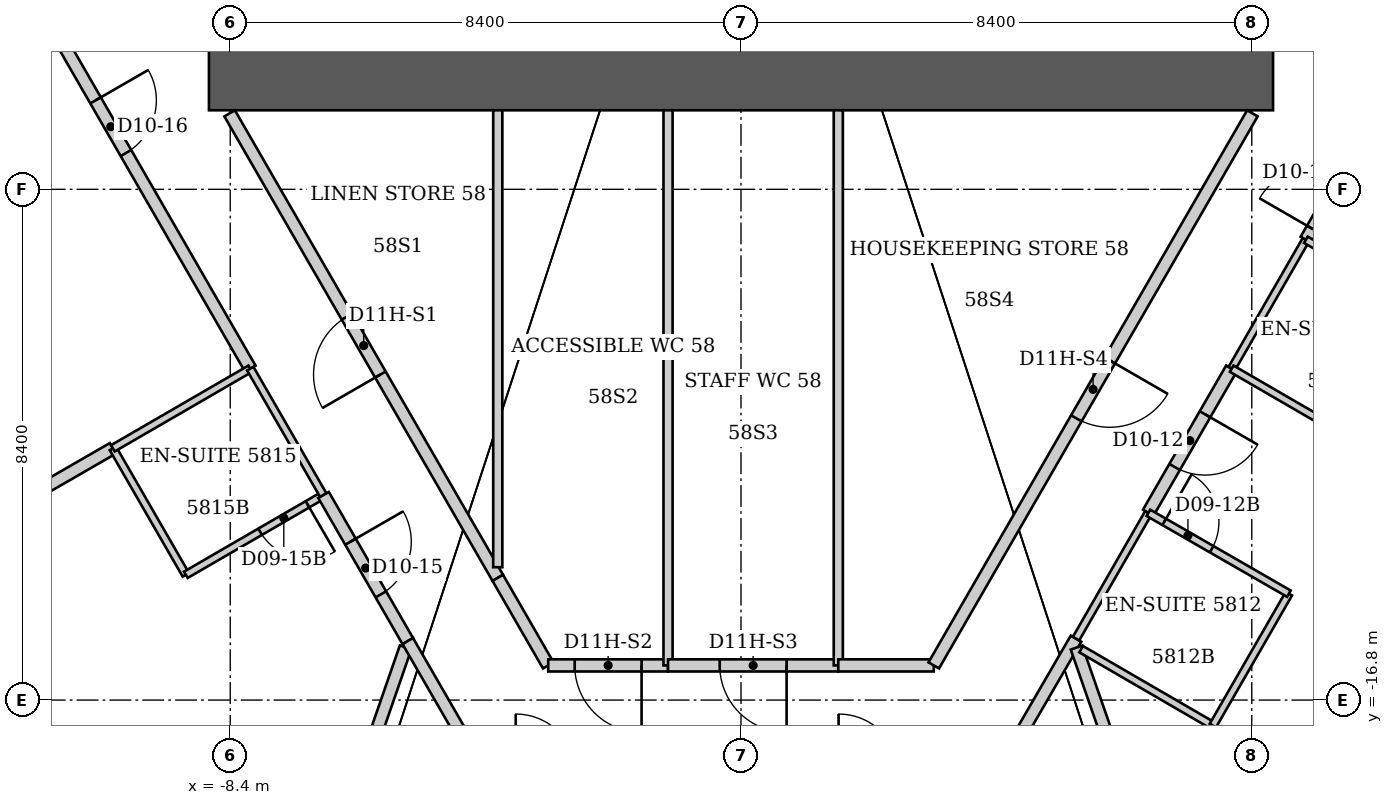
"""IFC4 building model, lengths in metres.
Left out: names, types, materials, properties, quantities, classifications, styles, units other than length and angle.
Written with IfcOpenShell. Run it as: python <this file> out.ifc"""

import sys

from ifc_helpers import new_model, si_unit, direction, frame, frame_2d, origin, place, context, subcontext, project, spatial, rectangle, extrude, element, fill, save


model = new_model("IFC4")
c1 = context("Model", 3, precision=1e-05, world=origin(), true_north=direction((0.0, 1.0)))
c2 = subcontext(c1, "Body", "Model", "MODEL_VIEW")
j1 = project(units=[si_unit("LENGTHUNIT", "METRE"), si_unit("PLANEANGLEUNIT", "RADIAN")], contexts=[c1])
p1 = place(None, origin())
s1 = spatial("IfcSite", under=j1, at=p1, CompositionType="ELEMENT")
p2 = place(p1, origin())
s2 = spatial("IfcBuilding", under=s1, at=p2, CompositionType="ELEMENT")
p3 = place(p2, frame((0.0, 0.0, 232.6)))
s3 = spatial("IfcBuildingStorey", under=s2, at=p3, CompositionType="ELEMENT", Elevation=232.6)
p4 = place(p3, frame((-8.75, -6.6, 0.0), z_axis=(0.0, 0.0, 1.0), x_axis=(1.0, 0.0, 0.0)))
e1 = element("IfcWall", 1, at=p4, inside=s3, PredefinedType="SHEAR", context=c2, shape_type="SweptSolid", body=[
    extrude(rectangle(XDim=17.5, YDim=1.0, at=frame_2d((8.75, 0.0))), origin(), (0.0, 0.0, 1.0), 3.8),
])
p5 = place(p3, frame((-15.326, -15.54, 0.0), z_axis=(0.0, 0.0, 1.0), x_axis=(0.866342721203, 0.499449986905, 0.0)))
e2 = element("IfcWall", 2, at=p5, inside=s3, PredefinedType="PARTITIONING", context=c2, shape_type="SweptSolid", body=[
    extrude(rectangle(XDim=5.767, YDim=0.2, at=frame_2d((2.883, 0.0))), origin(), (0.0, 0.0, 1.0), 3.64),
])
p6 = place(p3, frame((-12.66, -3.39, 0.0), z_axis=(0.0, 0.0, 1.0), x_axis=(0.499511590934, -0.866307203319, 0.0)))
e3 = element("IfcWall", 3, at=p6, inside=s3, PredefinedType="PARTITIONING", context=c2, shape_type="SweptSolid", body=[
    extrude(rectangle(XDim=9.189, YDim=0.2, at=frame_2d((4.594, 0.0))), origin(), (0.0, 0.0, 1.0), 3.64),
])
p7 = place(p6, frame((4.094, 0.0, 0.0)))
e4 = element("IfcOpeningElement", 4, at=p7, cuts=e3, PredefinedType="OPENING", context=c2, shape_type="SweptSolid", body=[
    extrude(rectangle(XDim=1.0, YDim=2.13, at=frame_2d((0.5, 1.065))), frame((0.0, 0.1, 0.0), z_axis=(0.0, -1.0, 0.0), x_axis=(1.0, 0.0, 0.0)), (0.0, 0.0, 1.0), 0.2),
])
p8 = place(p3, frame((-10.33, -12.66, 0.0), z_axis=(0.0, 0.0, 1.0), x_axis=(0.499693115345, -0.866202511239, 0.0)))
e5 = element("IfcWall", 5, at=p8, inside=s3, PredefinedType="PARTITIONING", context=c2, shape_type="SweptSolid", body=[
    extrude(rectangle(XDim=2.401, YDim=0.12, at=frame_2d((1.201, 0.0))), origin(), (0.0, 0.0, 1.0), 3.64),
])
p9 = place(p3, frame((-10.33, -12.66, 0.0), z_axis=(0.0, 0.0, 1.0), x_axis=(0.865195830568, 0.501434118073, 0.0)))
e6 = element("IfcWall", 6, at=p9, inside=s3, PredefinedType="PARTITIONING", context=c2, shape_type="SweptSolid", body=[
    extrude(rectangle(XDim=2.612, YDim=0.12, at=frame_2d((1.306, 0.0))), origin(), (0.0, 0.0, 1.0), 3.64),
])
p10 = place(p3, frame((-9.13, -14.74, 0.0), z_axis=(0.0, 0.0, 1.0), x_axis=(0.865131772832, 0.501544629755, 0.0)))
e7 = element("IfcWall", 7, at=p10, inside=s3, PredefinedType="PARTITIONING", context=c2, shape_type="SweptSolid", body=[
    extrude(rectangle(XDim=2.612, YDim=0.12, at=frame_2d((1.306, 0.0))), origin(), (0.0, 0.0, 1.0), 3.64),
])
p11 = place(p10, frame((1.412, 0.0, 0.0)))
e8 = element("IfcOpeningElement", 8, at=p11, cuts=e7, PredefinedType="OPENING", context=c2, shape_type="SweptSolid", body=[
    extrude(rectangle(XDim=0.9, YDim=2.03, at=frame_2d((0.45, 1.015))), frame((0.0, 0.06, 0.0), z_axis=(0.0, -1.0, 0.0), x_axis=(1.0, 0.0, 0.0)), (0.0, 0.0, 1.0), 0.12),
])
p12 = place(p3, frame((-9.01, -26.012, 0.0), z_axis=(0.0, 0.0, 1.0), x_axis=(0.327582991606, 0.944822408504, 0.0)))
e9 = element("IfcWall", 9, at=p12, inside=s3, PredefinedType="PARTITIONING", context=c2, shape_type="SweptSolid", body=[
    extrude(rectangle(XDim=10.667, YDim=0.2, at=frame_2d((5.333, 0.0))), origin(), (0.0, 0.0, 1.0), 3.64),
])
p13 = place(p3, frame((-8.07, -11.35, 0.0), z_axis=(0.0, 0.0, 1.0), x_axis=(0.499737123639, -0.866177122335, 0.0)))
e10 = element("IfcWall", 10, at=p13, inside=s3, PredefinedType="PARTITIONING", context=c2, shape_type="SweptSolid", body=[
    extrude(rectangle(XDim=2.401, YDim=0.12, at=frame_2d((1.201, 0.0))), origin(), (0.0, 0.0, 1.0), 3.64),
])
p14 = place(p3, frame((-6.865, -13.427, 0.0), z_axis=(0.0, 0.0, 1.0), x_axis=(0.499453176768, -0.866340882226, 0.0)))
e11 = element("IfcWall", 11, at=p14, inside=s3, PredefinedType="PARTITIONING", context=c2, shape_type="SweptSolid", body=[
    extrude(rectangle(XDim=2.773, YDim=0.2, at=frame_2d((1.387, 0.0))), origin(), (0.0, 0.0, 1.0), 3.64),
])
p15 = place(p14, frame((0.887, 0.0, 0.0)))
e12 = element("IfcOpeningElement", 12, at=p15, cuts=e11, PredefinedType="OPENING", context=c2, shape_type="SweptSolid", body=[
    extrude(rectangle(XDim=1.0, YDim=2.13, at=frame_2d((0.5, 1.065))), frame((0.0, 0.1, 0.0), z_axis=(0.0, -1.0, 0.0), x_axis=(1.0, 0.0, 0.0)), (0.0, 0.0, 1.0), 0.2),
])
p16 = place(p3, frame((-5.48, -15.83, 0.0), z_axis=(0.0, 0.0, 1.0), x_axis=(0.499963722229, -0.866046347752, 0.0)))
e13 = element("IfcWall", 13, at=p16, inside=s3, PredefinedType="PARTITIONING", context=c2, shape_type="SweptSolid", body=[
    extrude(rectangle(XDim=2.54, YDim=0.2, at=frame_2d((1.27, 0.0))), origin(), (0.0, 0.0, 1.0), 3.64),
])
p17 = place(p3, frame((-4.0, -14.79, 0.0), z_axis=(0.0, 0.0, 1.0), x_axis=(-0.499916512745, 0.866073599808, 0.0)))
e14 = element("IfcWall", 14, at=p17, inside=s3, PredefinedType="PARTITIONING", context=c2, shape_type="SweptSolid", body=[
    extrude(rectangle(XDim=8.821, YDim=0.2, at=frame_2d((4.411, 0.0))), origin(), (0.0, 0.0, 1.0), 3.64),
])
p18 = place(p17, frame((3.861, 0.0, 0.0)))
e15 = element("IfcOpeningElement", 15, at=p18, cuts=e14, PredefinedType="OPENING", context=c2, shape_type="SweptSolid", body=[
    extrude(rectangle(XDim=1.1, YDim=2.2, at=frame_2d((0.55, 1.1))), frame((0.0, 0.1, 0.0), z_axis=(0.0, -1.0, 0.0), x_axis=(1.0, 0.0, 0.0)), (0.0, 0.0, 1.0), 0.2),
])
p19 = place(p3, frame((-4.0, -7.1, 0.0), z_axis=(0.0, 0.0, 1.0), x_axis=(0.0, -1.0, 0.0)))
e16 = element("IfcWall", 16, at=p19, inside=s3, PredefinedType="PARTITIONING", context=c2, shape_type="SweptSolid", body=[
    extrude(rectangle(XDim=7.515, YDim=0.15, at=frame_2d((3.757, 0.0))), origin(), (0.0, 0.0, 1.0), 3.64),
])
p20 = place(p3, frame((-3.17, -16.23, 0.0), z_axis=(0.0, 0.0, 1.0), x_axis=(-0.499425709803, 0.866356716594, 0.0)))
e17 = element("IfcWall", 17, at=p20, inside=s3, PredefinedType="PARTITIONING", context=c2, shape_type="SweptSolid", body=[
    extrude(rectangle(XDim=1.662, YDim=0.2, at=frame_2d((0.831, 0.0))), origin(), (0.0, 0.0, 1.0), 3.64),
])
p21 = place(p3, frame((-1.2, -16.23, 0.0), z_axis=(0.0, 0.0, 1.0), x_axis=(-1.0, 0.0, 0.0)))
e18 = element("IfcWall", 18, at=p21, inside=s3, PredefinedType="PARTITIONING", context=c2, shape_type="SweptSolid", body=[
    extrude(rectangle(XDim=1.97, YDim=0.2, at=frame_2d((0.985, 0.0))), origin(), (0.0, 0.0, 1.0), 3.64),
])
p22 = place(p21, frame((0.435, 0.0, 0.0)))
e19 = element("IfcOpeningElement", 19, at=p22, cuts=e18, PredefinedType="OPENING", context=c2, shape_type="SweptSolid", body=[
    extrude(rectangle(XDim=1.1, YDim=2.2, at=frame_2d((0.55, 1.1))), frame((0.0, 0.1, 0.0), z_axis=(0.0, -1.0, 0.0), x_axis=(1.0, 0.0, 0.0)), (0.0, 0.0, 1.0), 0.2),
])
p23 = place(p3, frame((-1.2, -7.1, 0.0), z_axis=(0.0, 0.0, 1.0), x_axis=(0.0, -1.0, 0.0)))
e20 = element("IfcWall", 20, at=p23, inside=s3, PredefinedType="PARTITIONING", context=c2, shape_type="SweptSolid", body=[
    extrude(rectangle(XDim=9.13, YDim=0.15, at=frame_2d((4.565, 0.0))), origin(), (0.0, 0.0, 1.0), 3.64),
])
p24 = place(p3, frame((1.6, -16.23, 0.0), z_axis=(0.0, 0.0, 1.0), x_axis=(-1.0, 0.0, 0.0)))
e21 = element("IfcWall", 21, at=p24, inside=s3, PredefinedType="PARTITIONING", context=c2, shape_type="SweptSolid", body=[
    extrude(rectangle(XDim=2.8, YDim=0.2, at=frame_2d((1.4, 0.0))), origin(), (0.0, 0.0, 1.0), 3.64),
])
p25 = place(p24, frame((0.85, 0.0, 0.0)))
e22 = element("IfcOpeningElement", 22, at=p25, cuts=e21, PredefinedType="OPENING", context=c2, shape_type="SweptSolid", body=[
    extrude(rectangle(XDim=1.1, YDim=2.2, at=frame_2d((0.55, 1.1))), frame((0.0, 0.1, 0.0), z_axis=(0.0, -1.0, 0.0), x_axis=(1.0, 0.0, 0.0)), (0.0, 0.0, 1.0), 0.2),
])
p26 = place(p3, frame((1.6, -7.1, 0.0), z_axis=(0.0, 0.0, 1.0), x_axis=(0.0, -1.0, 0.0)))
e23 = element("IfcWall", 23, at=p26, inside=s3, PredefinedType="PARTITIONING", context=c2, shape_type="SweptSolid", body=[
    extrude(rectangle(XDim=9.13, YDim=0.15, at=frame_2d((4.565, 0.0))), origin(), (0.0, 0.0, 1.0), 3.64),
])
p27 = place(p3, frame((3.17, -16.23, 0.0), z_axis=(0.0, 0.0, 1.0), x_axis=(-1.0, 0.0, 0.0)))
e24 = element("IfcWall", 24, at=p27, inside=s3, PredefinedType="PARTITIONING", context=c2, shape_type="SweptSolid", body=[
    extrude(rectangle(XDim=1.57, YDim=0.2, at=frame_2d((0.785, 0.0))), origin(), (0.0, 0.0, 1.0), 3.64),
])
p28 = place(p3, frame((5.51, -15.79, 0.0), z_axis=(0.0, 0.0, 1.0), x_axis=(-0.501964949025, -0.864887963814, 0.0)))
e25 = element("IfcWall", 25, at=p28, inside=s3, PredefinedType="PARTITIONING", context=c2, shape_type="SweptSolid", body=[
    extrude(rectangle(XDim=2.59, YDim=0.2, at=frame_2d((1.295, 0.0))), origin(), (0.0, 0.0, 1.0), 3.64),
])
p29 = place(p3, frame((5.51, -15.79, 0.0), z_axis=(0.0, 0.0, 1.0), x_axis=(0.49836161924, 0.866969259241, 0.0)))
e26 = element("IfcWall", 26, at=p29, inside=s3, PredefinedType="PARTITIONING", context=c2, shape_type="SweptSolid", body=[
    extrude(rectangle(XDim=2.388, YDim=0.12, at=frame_2d((1.194, 0.0))), origin(), (0.0, 0.0, 1.0), 3.64),
])
p30 = place(p3, frame((5.517, -15.937, 0.0), z_axis=(0.0, 0.0, 1.0), x_axis=(0.328714924291, -0.944429191919, 0.0)))
e27 = element("IfcWall", 27, at=p30, inside=s3, PredefinedType="PARTITIONING", context=c2, shape_type="SweptSolid", body=[
    extrude(rectangle(XDim=2.534, YDim=0.2, at=frame_2d((1.267, 0.0))), origin(), (0.0, 0.0, 1.0), 3.64),
])
p31 = place(p3, frame((5.594, -15.963, 0.0), z_axis=(0.0, 0.0, 1.0), x_axis=(0.864900876675, -0.501942699445, 0.0)))
e28 = element("IfcWall", 28, at=p31, inside=s3, PredefinedType="PARTITIONING", context=c2, shape_type="SweptSolid", body=[
    extrude(rectangle(XDim=2.505, YDim=0.12, at=frame_2d((1.252, 0.0))), origin(), (0.0, 0.0, 1.0), 3.038),
])
p32 = place(p3, frame((7.76, -17.22, 0.0), z_axis=(0.0, 0.0, 1.0), x_axis=(0.499159685399, 0.866510016372, 0.0)))
e29 = element("IfcWall", 29, at=p32, inside=s3, PredefinedType="PARTITIONING", context=c2, shape_type="SweptSolid", body=[
    extrude(rectangle(XDim=2.504, YDim=0.12, at=frame_2d((1.252, 0.0))), origin(), (0.0, 0.0, 1.0), 3.64),
])
p33 = place(p3, frame((8.065, -11.347, 0.0), z_axis=(0.0, 0.0, 1.0), x_axis=(-0.499611785355, -0.866249423627, 0.0)))
e30 = element("IfcWall", 30, at=p33, inside=s3, PredefinedType="PARTITIONING", context=c2, shape_type="SweptSolid", body=[
    extrude(rectangle(XDim=2.738, YDim=0.2, at=frame_2d((1.369, 0.0))), origin(), (0.0, 0.0, 1.0), 3.64),
])
p34 = place(p33, frame((0.869, 0.0, 0.0)))
e31 = element("IfcOpeningElement", 31, at=p34, cuts=e30, PredefinedType="OPENING", context=c2, shape_type="SweptSolid", body=[
    extrude(rectangle(XDim=1.0, YDim=2.13, at=frame_2d((0.5, 1.065))), frame((0.0, 0.1, 0.0), z_axis=(0.0, -1.0, 0.0), x_axis=(1.0, 0.0, 0.0)), (0.0, 0.0, 1.0), 0.2),
])
p35 = place(p3, frame((8.07, -11.35, 0.0), z_axis=(0.0, 0.0, 1.0), x_axis=(0.498748634132, 0.866746675766, 0.0)))
e32 = element("IfcWall", 32, at=p35, inside=s3, PredefinedType="PARTITIONING", context=c2, shape_type="SweptSolid", body=[
    extrude(rectangle(XDim=2.446, YDim=0.12, at=frame_2d((1.223, 0.0))), origin(), (0.0, 0.0, 1.0), 3.64),
])
p36 = place(p3, frame((8.07, -11.35, 0.0), z_axis=(0.0, 0.0, 1.0), x_axis=(0.865006586495, -0.501760505939, 0.0)))
e33 = element("IfcWall", 33, at=p36, inside=s3, PredefinedType="PARTITIONING", context=c2, shape_type="SweptSolid", body=[
    extrude(rectangle(XDim=2.67, YDim=0.12, at=frame_2d((1.335, 0.0))), origin(), (0.0, 0.0, 1.0), 3.64),
])
p37 = place(p3, frame((8.41, -7.15, 0.0), z_axis=(0.0, 0.0, 1.0), x_axis=(-0.499828628176, -0.866124322748, 0.0)))
e34 = element("IfcWall", 34, at=p37, inside=s3, PredefinedType="PARTITIONING", context=c2, shape_type="SweptSolid", body=[
    extrude(rectangle(XDim=10.484, YDim=0.2, at=frame_2d((5.242, 0.0))), origin(), (0.0, 0.0, 1.0), 3.64),
])
p38 = place(p37, frame((4.692, 0.0, 0.0)))
e35 = element("IfcOpeningElement", 35, at=p38, cuts=e34, PredefinedType="OPENING", context=c2, shape_type="SweptSolid", body=[
    extrude(rectangle(XDim=1.1, YDim=2.2, at=frame_2d((0.55, 1.1))), frame((0.0, 0.1, 0.0), z_axis=(0.0, -1.0, 0.0), x_axis=(1.0, 0.0, 0.0)), (0.0, 0.0, 1.0), 0.2),
])
p39 = place(p3, frame((9.01, -15.05, 0.0), z_axis=(0.0, 0.0, 1.0), x_axis=(-0.866615255992, 0.498976951453, 0.0)))
e36 = element("IfcWall", 36, at=p39, inside=s3, PredefinedType="PARTITIONING", context=c2, shape_type="SweptSolid", body=[
    extrude(rectangle(XDim=2.666, YDim=0.12, at=frame_2d((1.333, 0.0))), origin(), (0.0, 0.0, 1.0), 3.64),
])
p40 = place(p39, frame((1.466, 0.0, 0.0)))
e37 = element("IfcOpeningElement", 37, at=p40, cuts=e36, PredefinedType="OPENING", context=c2, shape_type="SweptSolid", body=[
    extrude(rectangle(XDim=0.9, YDim=2.03, at=frame_2d((0.45, 1.015))), frame((0.0, 0.06, 0.0), z_axis=(0.0, -1.0, 0.0), x_axis=(1.0, 0.0, 0.0)), (0.0, 0.0, 1.0), 0.12),
])
p41 = place(p3, frame((9.29, -9.23, 0.0), z_axis=(0.0, 0.0, 1.0), x_axis=(0.499910949922, 0.866076810767, 0.0)))
e38 = element("IfcWall", 38, at=p41, inside=s3, PredefinedType="PARTITIONING", context=c2, shape_type="SweptSolid", body=[
    extrude(rectangle(XDim=1.42, YDim=0.2, at=frame_2d((0.71, 0.0))), origin(), (0.0, 0.0, 1.0), 3.64),
])
p42 = place(p41, frame((0.21, 0.0, 0.0)))
e39 = element("IfcOpeningElement", 39, at=p42, cuts=e38, PredefinedType="OPENING", context=c2, shape_type="SweptSolid", body=[
    extrude(rectangle(XDim=1.0, YDim=2.13, at=frame_2d((0.5, 1.065))), frame((0.0, 0.1, 0.0), z_axis=(0.0, -1.0, 0.0), x_axis=(1.0, 0.0, 0.0)), (0.0, 0.0, 1.0), 0.2),
])
p43 = place(p3, frame((11.6, -10.56, 0.0), z_axis=(0.0, 0.0, 1.0), x_axis=(-0.866615255992, 0.498976951453, 0.0)))
e40 = element("IfcWall", 40, at=p43, inside=s3, PredefinedType="PARTITIONING", context=c2, shape_type="SweptSolid", body=[
    extrude(rectangle(XDim=2.666, YDim=0.12, at=frame_2d((1.333, 0.0))), origin(), (0.0, 0.0, 1.0), 3.64),
])
p44 = place(p43, frame((1.466, 0.0, 0.0)))
e41 = element("IfcOpeningElement", 41, at=p44, cuts=e40, PredefinedType="OPENING", context=c2, shape_type="SweptSolid", body=[
    extrude(rectangle(XDim=0.9, YDim=2.03, at=frame_2d((0.45, 1.015))), frame((0.0, 0.06, 0.0), z_axis=(0.0, -1.0, 0.0), x_axis=(1.0, 0.0, 0.0)), (0.0, 0.0, 1.0), 0.12),
])
p45 = place(p42, origin())
e42 = element("IfcDoor", 42, at=p45, inside=s3, OperationType="SINGLE_SWING_LEFT", PredefinedType="DOOR", context=c2, shape_type="SweptSolid", body=[
    extrude(rectangle(XDim=1.0, YDim=2.13, at=frame_2d((0.5, 1.065))), frame((0.0, 0.025, 0.0), z_axis=(0.0, -1.0, 0.0), x_axis=(1.0, 0.0, 0.0)), (0.0, 0.0, 1.0), 0.05),
])
fill(e39, e42)
p46 = place(p34, origin())
e43 = element("IfcDoor", 43, at=p46, inside=s3, OperationType="SINGLE_SWING_LEFT", PredefinedType="DOOR", context=c2, shape_type="SweptSolid", body=[
    extrude(rectangle(XDim=1.0, YDim=2.13, at=frame_2d((0.5, 1.065))), frame((0.0, 0.025, 0.0), z_axis=(0.0, -1.0, 0.0), x_axis=(1.0, 0.0, 0.0)), (0.0, 0.0, 1.0), 0.05),
])
fill(e31, e43)
p47 = place(p40, origin())
e44 = element("IfcDoor", 44, at=p47, inside=s3, OperationType="SINGLE_SWING_RIGHT", PredefinedType="DOOR", context=c2, shape_type="SweptSolid", body=[
    extrude(rectangle(XDim=0.9, YDim=2.03, at=frame_2d((0.45, 1.015))), frame((0.0, 0.025, 0.0), z_axis=(0.0, -1.0, 0.0), x_axis=(1.0, 0.0, 0.0)), (0.0, 0.0, 1.0), 0.05),
])
fill(e37, e44)
p48 = place(p15, origin())
e45 = element("IfcDoor", 45, at=p48, inside=s3, OperationType="SINGLE_SWING_LEFT", PredefinedType="DOOR", context=c2, shape_type="SweptSolid", body=[
    extrude(rectangle(XDim=1.0, YDim=2.13, at=frame_2d((0.5, 1.065))), frame((0.0, 0.025, 0.0), z_axis=(0.0, -1.0, 0.0), x_axis=(1.0, 0.0, 0.0)), (0.0, 0.0, 1.0), 0.05),
])
fill(e12, e45)
p49 = place(p11, origin())
e46 = element("IfcDoor", 46, at=p49, inside=s3, OperationType="SINGLE_SWING_RIGHT", PredefinedType="DOOR", context=c2, shape_type="SweptSolid", body=[
    extrude(rectangle(XDim=0.9, YDim=2.03, at=frame_2d((0.45, 1.015))), frame((0.0, 0.025, 0.0), z_axis=(0.0, -1.0, 0.0), x_axis=(1.0, 0.0, 0.0)), (0.0, 0.0, 1.0), 0.05),
])
fill(e8, e46)
p50 = place(p7, origin())
e47 = element("IfcDoor", 47, at=p50, inside=s3, OperationType="SINGLE_SWING_LEFT", PredefinedType="DOOR", context=c2, shape_type="SweptSolid", body=[
    extrude(rectangle(XDim=1.0, YDim=2.13, at=frame_2d((0.5, 1.065))), frame((0.0, 0.025, 0.0), z_axis=(0.0, -1.0, 0.0), x_axis=(1.0, 0.0, 0.0)), (0.0, 0.0, 1.0), 0.05),
])
fill(e4, e47)
p51 = place(p18, origin())
e48 = element("IfcDoor", 48, at=p51, inside=s3, OperationType="SINGLE_SWING_LEFT", PredefinedType="DOOR", context=c2, shape_type="SweptSolid", body=[
    extrude(rectangle(XDim=1.1, YDim=2.2, at=frame_2d((0.55, 1.1))), frame((0.0, 0.025, 0.0), z_axis=(0.0, -1.0, 0.0), x_axis=(1.0, 0.0, 0.0)), (0.0, 0.0, 1.0), 0.05),
])
fill(e15, e48)
p52 = place(p22, origin())
e49 = element("IfcDoor", 49, at=p52, inside=s3, OperationType="SINGLE_SWING_LEFT", PredefinedType="DOOR", context=c2, shape_type="SweptSolid", body=[
    extrude(rectangle(XDim=1.1, YDim=2.2, at=frame_2d((0.55, 1.1))), frame((0.0, 0.025, 0.0), z_axis=(0.0, -1.0, 0.0), x_axis=(1.0, 0.0, 0.0)), (0.0, 0.0, 1.0), 0.05),
])
fill(e19, e49)
p53 = place(p25, origin())
e50 = element("IfcDoor", 50, at=p53, inside=s3, OperationType="SINGLE_SWING_LEFT", PredefinedType="DOOR", context=c2, shape_type="SweptSolid", body=[
    extrude(rectangle(XDim=1.1, YDim=2.2, at=frame_2d((0.55, 1.1))), frame((0.0, 0.025, 0.0), z_axis=(0.0, -1.0, 0.0), x_axis=(1.0, 0.0, 0.0)), (0.0, 0.0, 1.0), 0.05),
])
fill(e22, e50)
p54 = place(p38, origin())
e51 = element("IfcDoor", 51, at=p54, inside=s3, OperationType="SINGLE_SWING_LEFT", PredefinedType="DOOR", context=c2, shape_type="SweptSolid", body=[
    extrude(rectangle(XDim=1.1, YDim=2.2, at=frame_2d((0.55, 1.1))), frame((0.0, 0.025, 0.0), z_axis=(0.0, -1.0, 0.0), x_axis=(1.0, 0.0, 0.0)), (0.0, 0.0, 1.0), 0.05),
])
fill(e35, e51)
save(model, sys.argv[1])
